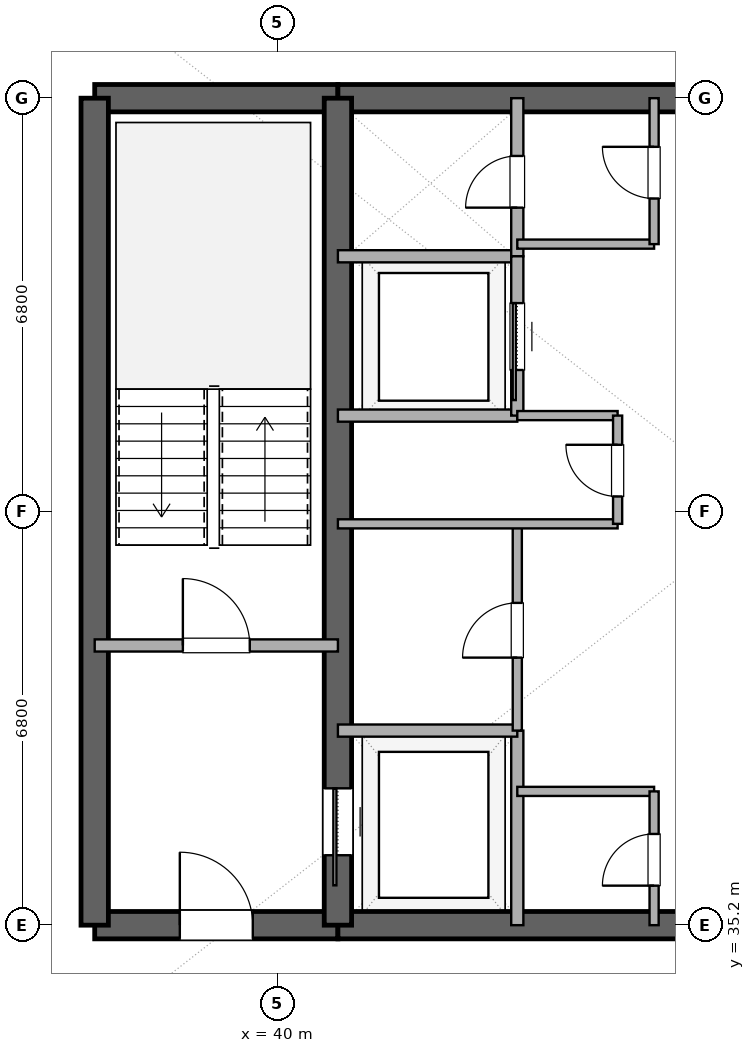
"""IFC4 building model, lengths in metres.
Left out: names, types, materials, properties, quantities, classifications, styles, units other than length and angle.
Written with IfcOpenShell. Run it as: python <this file> out.ifc"""

import sys

from ifc_helpers import new_model, si_unit, direction, frame, frame_2d, origin, place, context, subcontext, project, spatial, rectangle, extrude, element, fill, save


model = new_model("IFC4")
c1 = context("Model", 3, precision=1e-05, world=origin(), true_north=direction((0.0, 1.0)))
c2 = subcontext(c1, "Body", "Model", "MODEL_VIEW")
j1 = project(units=[si_unit("LENGTHUNIT", "METRE"), si_unit("PLANEANGLEUNIT", "RADIAN")], contexts=[c1])
p1 = place(None, origin())
s1 = spatial("IfcSite", under=j1, at=p1, CompositionType="ELEMENT")
p2 = place(p1, origin())
s2 = spatial("IfcBuilding", under=s1, at=p2, CompositionType="ELEMENT")
p3 = place(p2, frame((0.0, 0.0, 197.4)))
s3 = spatial("IfcBuildingStorey", under=s2, at=p3, CompositionType="ELEMENT", Elevation=197.4)
p4 = place(p3, frame((37.0, 35.2, 0.0), z_axis=(0.0, 0.0, 1.0), x_axis=(1.0, 0.0, 0.0)))
e1 = element("IfcWall", 1, at=p4, inside=s3, PredefinedType="SHEAR", context=c2, shape_type="SweptSolid", body=[
    extrude(rectangle(XDim=4.0, YDim=0.45, at=frame_2d((2.0, 0.0))), origin(), (0.0, 0.0, 1.0), 3.25),
])
p5 = place(p4, frame((1.4, 0.0, 0.0)))
e2 = element("IfcOpeningElement", 2, at=p5, cuts=e1, PredefinedType="OPENING", context=c2, shape_type="SweptSolid", body=[
    extrude(rectangle(XDim=1.2, YDim=2.15, at=frame_2d((0.6, 1.075))), frame((0.0, 0.235, 0.0), z_axis=(0.0, -1.0, 0.0), x_axis=(1.0, 0.0, 0.0)), (0.0, 0.0, 1.0), 0.47),
])
p6 = place(p3, frame((41.0, 35.2, 0.0), z_axis=(0.0, 0.0, 1.0), x_axis=(1.0, 0.0, 0.0)))
e3 = element("IfcWall", 3, at=p6, inside=s3, PredefinedType="SHEAR", context=c2, shape_type="SweptSolid", body=[
    extrude(rectangle(XDim=14.0, YDim=0.45, at=frame_2d((7.0, 0.0))), origin(), (0.0, 0.0, 1.0), 3.25),
])
p7 = place(p6, frame((6.1, 0.0, 0.0)))
e4 = element("IfcOpeningElement", 4, at=p7, cuts=e3, PredefinedType="OPENING", context=c2, shape_type="SweptSolid", body=[
    extrude(rectangle(XDim=1.8, YDim=2.25, at=frame_2d((0.9, 1.125))), frame((0.0, 0.235, 0.0), z_axis=(0.0, -1.0, 0.0), x_axis=(1.0, 0.0, 0.0)), (0.0, 0.0, 1.0), 0.47),
])
p8 = place(p3, frame((37.0, 48.8, 0.0), z_axis=(0.0, 0.0, 1.0), x_axis=(1.0, 0.0, 0.0)))
e5 = element("IfcWall", 5, at=p8, inside=s3, PredefinedType="SHEAR", context=c2, shape_type="SweptSolid", body=[
    extrude(rectangle(XDim=4.0, YDim=0.45, at=frame_2d((2.0, 0.0))), origin(), (0.0, 0.0, 1.0), 3.25),
])
p9 = place(p3, frame((41.0, 48.8, 0.0), z_axis=(0.0, 0.0, 1.0), x_axis=(1.0, 0.0, 0.0)))
e6 = element("IfcWall", 6, at=p9, inside=s3, PredefinedType="SHEAR", context=c2, shape_type="SweptSolid", body=[
    extrude(rectangle(XDim=14.0, YDim=0.45, at=frame_2d((7.0, 0.0))), origin(), (0.0, 0.0, 1.0), 3.25),
])
p10 = place(p9, frame((6.1, 0.0, 0.0)))
e7 = element("IfcOpeningElement", 7, at=p10, cuts=e6, PredefinedType="OPENING", context=c2, shape_type="SweptSolid", body=[
    extrude(rectangle(XDim=1.8, YDim=2.25, at=frame_2d((0.9, 1.125))), frame((0.0, 0.235, 0.0), z_axis=(0.0, -1.0, 0.0), x_axis=(1.0, 0.0, 0.0)), (0.0, 0.0, 1.0), 0.47),
])
p11 = place(p3, frame((37.0, 35.2, 0.0), z_axis=(0.0, 0.0, 1.0), x_axis=(0.0, 1.0, 0.0)))
e8 = element("IfcWall", 8, at=p11, inside=s3, PredefinedType="SHEAR", context=c2, shape_type="SweptSolid", body=[
    extrude(rectangle(XDim=13.6, YDim=0.45, at=frame_2d((6.8, 0.0))), origin(), (0.0, 0.0, 1.0), 3.25),
])
p12 = place(p3, frame((41.0, 35.2, 0.0), z_axis=(0.0, 0.0, 1.0), x_axis=(0.0, 1.0, 0.0)))
e9 = element("IfcWall", 9, at=p12, inside=s3, PredefinedType="SHEAR", context=c2, shape_type="SweptSolid", body=[
    extrude(rectangle(XDim=13.6, YDim=0.45, at=frame_2d((6.8, 0.0))), origin(), (0.0, 0.0, 1.0), 3.25),
])
p13 = place(p12, frame((1.15, 0.0, 0.0)))
e10 = element("IfcOpeningElement", 10, at=p13, cuts=e9, PredefinedType="OPENING", context=c2, shape_type="SweptSolid", body=[
    extrude(rectangle(XDim=1.1, YDim=2.2, at=frame_2d((0.55, 1.1))), frame((0.0, 0.235, 0.0), z_axis=(0.0, -1.0, 0.0), x_axis=(1.0, 0.0, 0.0)), (0.0, 0.0, 1.0), 0.47),
])
p14 = place(p3, frame((37.0, 39.8, 0.0), z_axis=(0.0, 0.0, 1.0), x_axis=(1.0, 0.0, 0.0)))
e11 = element("IfcWall", 11, at=p14, inside=s3, PredefinedType="SOLIDWALL", context=c2, shape_type="SweptSolid", body=[
    extrude(rectangle(XDim=4.0, YDim=0.2, at=frame_2d((2.0, 0.0))), origin(), (0.0, 0.0, 1.0), 2.61),
])
p15 = place(p14, frame((1.45, 0.0, 0.0)))
e12 = element("IfcOpeningElement", 12, at=p15, cuts=e11, PredefinedType="OPENING", context=c2, shape_type="SweptSolid", body=[
    extrude(rectangle(XDim=1.1, YDim=2.15, at=frame_2d((0.55, 1.075))), frame((0.0, 0.11, 0.0), z_axis=(0.0, -1.0, 0.0), x_axis=(1.0, 0.0, 0.0)), (0.0, 0.0, 1.0), 0.22),
])
p16 = place(p3, frame((43.95, 35.2, 0.0), z_axis=(0.0, 0.0, 1.0), x_axis=(0.0, 1.0, 0.0)))
e13 = element("IfcWall", 13, at=p16, inside=s3, PredefinedType="SOLIDWALL", context=c2, shape_type="SweptSolid", body=[
    extrude(rectangle(XDim=3.2, YDim=0.2, at=frame_2d((1.6, 0.0))), origin(), (0.0, 0.0, 1.0), 2.61),
])
for number, where, z_axis, x_axis in (
    (14, (41.0, 38.4, 0.0), (0.0, 0.0, 1.0), (1.0, 0.0, 0.0)),
    (15, (41.0, 46.2, 0.0), (0.0, 0.0, 1.0), (1.0, 0.0, 0.0)),
):
    element("IfcWall", number, at=place(p3, frame(where, z_axis=z_axis, x_axis=x_axis)), inside=s3, PredefinedType="SOLIDWALL", context=c2, shape_type="SweptSolid", body=[
        extrude(rectangle(XDim=2.95, YDim=0.2, at=frame_2d((1.475, 0.0))), origin(), (0.0, 0.0, 1.0), 2.61),
    ])
p17 = place(p3, frame((43.95, 46.2, 0.0), z_axis=(0.0, 0.0, 1.0), x_axis=(0.0, 1.0, 0.0)))
e16 = element("IfcWall", 16, at=p17, inside=s3, PredefinedType="SOLIDWALL", context=c2, shape_type="SweptSolid", body=[
    extrude(rectangle(XDim=2.6, YDim=0.2, at=frame_2d((1.3, 0.0))), origin(), (0.0, 0.0, 1.0), 2.61),
])
p18 = place(p17, frame((0.8, 0.0, 0.0)))
e17 = element("IfcOpeningElement", 17, at=p18, cuts=e16, PredefinedType="OPENING", context=c2, shape_type="SweptSolid", body=[
    extrude(rectangle(XDim=0.85, YDim=2.15, at=frame_2d((0.425, 1.075))), frame((0.0, 0.11, 0.0), z_axis=(0.0, -1.0, 0.0), x_axis=(1.0, 0.0, 0.0)), (0.0, 0.0, 1.0), 0.22),
])
p19 = place(p3, frame((41.0, 43.58, 0.0), z_axis=(0.0, 0.0, 1.0), x_axis=(1.0, 0.0, 0.0)))
e18 = element("IfcWall", 18, at=p19, inside=s3, PredefinedType="SOLIDWALL", context=c2, shape_type="SweptSolid", body=[
    extrude(rectangle(XDim=2.95, YDim=0.2, at=frame_2d((1.475, 0.0))), origin(), (0.0, 0.0, 1.0), 2.61),
])
p20 = place(p3, frame((43.95, 43.58, 0.0), z_axis=(0.0, 0.0, 1.0), x_axis=(0.0, 1.0, 0.0)))
e19 = element("IfcWall", 19, at=p20, inside=s3, PredefinedType="SOLIDWALL", context=c2, shape_type="SweptSolid", body=[
    extrude(rectangle(XDim=2.62, YDim=0.2, at=frame_2d((1.31, 0.0))), origin(), (0.0, 0.0, 1.0), 2.61),
])
p21 = place(p20, frame((0.75, 0.0, 0.0)))
e20 = element("IfcOpeningElement", 20, at=p21, cuts=e19, PredefinedType="OPENING", context=c2, shape_type="SweptSolid", body=[
    extrude(rectangle(XDim=1.1, YDim=2.2, at=frame_2d((0.55, 1.1))), frame((0.0, 0.11, 0.0), z_axis=(0.0, -1.0, 0.0), x_axis=(1.0, 0.0, 0.0)), (0.0, 0.0, 1.0), 0.22),
])
p22 = place(p3, frame((43.95, 38.4, 0.0), z_axis=(0.0, 0.0, 1.0), x_axis=(0.0, 1.0, 0.0)))
e21 = element("IfcWall", 21, at=p22, inside=s3, PredefinedType="PARTITIONING", context=c2, shape_type="SweptSolid", body=[
    extrude(rectangle(XDim=3.4, YDim=0.15, at=frame_2d((1.7, 0.0))), origin(), (0.0, 0.0, 1.0), 2.61),
])
p23 = place(p22, frame((1.2, 0.0, 0.0)))
e22 = element("IfcOpeningElement", 22, at=p23, cuts=e21, PredefinedType="OPENING", context=c2, shape_type="SweptSolid", body=[
    extrude(rectangle(XDim=0.9, YDim=2.15, at=frame_2d((0.45, 1.075))), frame((0.0, 0.085, 0.0), z_axis=(0.0, -1.0, 0.0), x_axis=(1.0, 0.0, 0.0)), (0.0, 0.0, 1.0), 0.17),
])
p24 = place(p3, frame((41.0, 41.8, 0.0), z_axis=(0.0, 0.0, 1.0), x_axis=(1.0, 0.0, 0.0)))
e23 = element("IfcWall", 23, at=p24, inside=s3, PredefinedType="PARTITIONING", context=c2, shape_type="SweptSolid", body=[
    extrude(rectangle(XDim=4.6, YDim=0.15, at=frame_2d((2.3, 0.0))), origin(), (0.0, 0.0, 1.0), 2.61),
])
p25 = place(p3, frame((43.95, 43.58, 0.0), z_axis=(0.0, 0.0, 1.0), x_axis=(1.0, 0.0, 0.0)))
e24 = element("IfcWall", 24, at=p25, inside=s3, PredefinedType="PARTITIONING", context=c2, shape_type="SweptSolid", body=[
    extrude(rectangle(XDim=1.65, YDim=0.15, at=frame_2d((0.825, 0.0))), origin(), (0.0, 0.0, 1.0), 2.61),
])
p26 = place(p3, frame((45.6, 41.8, 0.0), z_axis=(0.0, 0.0, 1.0), x_axis=(0.0, 1.0, 0.0)))
e25 = element("IfcWall", 25, at=p26, inside=s3, PredefinedType="PARTITIONING", context=c2, shape_type="SweptSolid", body=[
    extrude(rectangle(XDim=1.78, YDim=0.15, at=frame_2d((0.89, 0.0))), origin(), (0.0, 0.0, 1.0), 2.61),
])
p27 = place(p26, frame((0.45, 0.0, 0.0)))
e26 = element("IfcOpeningElement", 26, at=p27, cuts=e25, PredefinedType="OPENING", context=c2, shape_type="SweptSolid", body=[
    extrude(rectangle(XDim=0.85, YDim=2.15, at=frame_2d((0.425, 1.075))), frame((0.0, 0.085, 0.0), z_axis=(0.0, -1.0, 0.0), x_axis=(1.0, 0.0, 0.0)), (0.0, 0.0, 1.0), 0.17),
])
p28 = place(p3, frame((43.95, 37.4, 0.0), z_axis=(0.0, 0.0, 1.0), x_axis=(1.0, 0.0, 0.0)))
e27 = element("IfcWall", 27, at=p28, inside=s3, PredefinedType="PARTITIONING", context=c2, shape_type="SweptSolid", body=[
    extrude(rectangle(XDim=2.25, YDim=0.15, at=frame_2d((1.125, 0.0))), origin(), (0.0, 0.0, 1.0), 2.61),
])
p29 = place(p3, frame((46.2, 35.2, 0.0), z_axis=(0.0, 0.0, 1.0), x_axis=(0.0, 1.0, 0.0)))
e28 = element("IfcWall", 28, at=p29, inside=s3, PredefinedType="PARTITIONING", context=c2, shape_type="SweptSolid", body=[
    extrude(rectangle(XDim=2.2, YDim=0.15, at=frame_2d((1.1, 0.0))), origin(), (0.0, 0.0, 1.0), 2.61),
])
p30 = place(p29, frame((0.65, 0.0, 0.0)))
e29 = element("IfcOpeningElement", 29, at=p30, cuts=e28, PredefinedType="OPENING", context=c2, shape_type="SweptSolid", body=[
    extrude(rectangle(XDim=0.85, YDim=2.15, at=frame_2d((0.425, 1.075))), frame((0.0, 0.085, 0.0), z_axis=(0.0, -1.0, 0.0), x_axis=(1.0, 0.0, 0.0)), (0.0, 0.0, 1.0), 0.17),
])
p31 = place(p3, frame((43.95, 46.4, 0.0), z_axis=(0.0, 0.0, 1.0), x_axis=(1.0, 0.0, 0.0)))
e30 = element("IfcWall", 30, at=p31, inside=s3, PredefinedType="PARTITIONING", context=c2, shape_type="SweptSolid", body=[
    extrude(rectangle(XDim=2.25, YDim=0.15, at=frame_2d((1.125, 0.0))), origin(), (0.0, 0.0, 1.0), 2.61),
])
p32 = place(p3, frame((46.2, 46.4, 0.0), z_axis=(0.0, 0.0, 1.0), x_axis=(0.0, 1.0, 0.0)))
e31 = element("IfcWall", 31, at=p32, inside=s3, PredefinedType="PARTITIONING", context=c2, shape_type="SweptSolid", body=[
    extrude(rectangle(XDim=2.4, YDim=0.15, at=frame_2d((1.2, 0.0))), origin(), (0.0, 0.0, 1.0), 2.61),
])
p33 = place(p32, frame((0.75, 0.0, 0.0)))
e32 = element("IfcOpeningElement", 32, at=p33, cuts=e31, PredefinedType="OPENING", context=c2, shape_type="SweptSolid", body=[
    extrude(rectangle(XDim=0.85, YDim=2.15, at=frame_2d((0.425, 1.075))), frame((0.0, 0.085, 0.0), z_axis=(0.0, -1.0, 0.0), x_axis=(1.0, 0.0, 0.0)), (0.0, 0.0, 1.0), 0.17),
])
p34 = place(p13, origin())
e33 = element("IfcDoor", 33, at=p34, inside=s3, OperationType="SLIDING_TO_LEFT", PredefinedType="DOOR", context=c2, shape_type="SweptSolid", body=[
    extrude(rectangle(XDim=1.1, YDim=2.2, at=frame_2d((0.55, 1.1))), frame((0.0, 0.025, 0.0), z_axis=(0.0, -1.0, 0.0), x_axis=(1.0, 0.0, 0.0)), (0.0, 0.0, 1.0), 0.05),
])
fill(e10, e33)
p35 = place(p5, origin())
e34 = element("IfcDoor", 34, at=p35, inside=s3, OperationType="SINGLE_SWING_LEFT", PredefinedType="DOOR", context=c2, shape_type="SweptSolid", body=[
    extrude(rectangle(XDim=1.2, YDim=2.15, at=frame_2d((0.6, 1.075))), frame((0.0, 0.025, 0.0), z_axis=(0.0, -1.0, 0.0), x_axis=(1.0, 0.0, 0.0)), (0.0, 0.0, 1.0), 0.05),
])
fill(e2, e34)
p36 = place(p15, origin())
e35 = element("IfcDoor", 35, at=p36, inside=s3, OperationType="SINGLE_SWING_LEFT", PredefinedType="DOOR", context=c2, shape_type="SweptSolid", body=[
    extrude(rectangle(XDim=1.1, YDim=2.15, at=frame_2d((0.55, 1.075))), frame((0.0, 0.025, 0.0), z_axis=(0.0, -1.0, 0.0), x_axis=(1.0, 0.0, 0.0)), (0.0, 0.0, 1.0), 0.05),
])
fill(e12, e35)
p37 = place(p18, origin())
e36 = element("IfcDoor", 36, at=p37, inside=s3, OperationType="SINGLE_SWING_LEFT", PredefinedType="DOOR", context=c2, shape_type="SweptSolid", body=[
    extrude(rectangle(XDim=0.85, YDim=2.15, at=frame_2d((0.425, 1.075))), frame((0.0, 0.025, 0.0), z_axis=(0.0, -1.0, 0.0), x_axis=(1.0, 0.0, 0.0)), (0.0, 0.0, 1.0), 0.05),
])
fill(e17, e36)
p38 = place(p21, origin())
e37 = element("IfcDoor", 37, at=p38, inside=s3, OperationType="SLIDING_TO_LEFT", PredefinedType="DOOR", context=c2, shape_type="SweptSolid", body=[
    extrude(rectangle(XDim=1.1, YDim=2.2, at=frame_2d((0.55, 1.1))), frame((0.0, 0.025, 0.0), z_axis=(0.0, -1.0, 0.0), x_axis=(1.0, 0.0, 0.0)), (0.0, 0.0, 1.0), 0.05),
])
fill(e20, e37)
p39 = place(p23, origin())
e38 = element("IfcDoor", 38, at=p39, inside=s3, OperationType="SINGLE_SWING_LEFT", PredefinedType="DOOR", context=c2, shape_type="SweptSolid", body=[
    extrude(rectangle(XDim=0.9, YDim=2.15, at=frame_2d((0.45, 1.075))), frame((0.0, 0.025, 0.0), z_axis=(0.0, -1.0, 0.0), x_axis=(1.0, 0.0, 0.0)), (0.0, 0.0, 1.0), 0.05),
])
fill(e22, e38)
p40 = place(p27, origin())
e39 = element("IfcDoor", 39, at=p40, inside=s3, OperationType="SINGLE_SWING_RIGHT", PredefinedType="DOOR", context=c2, shape_type="SweptSolid", body=[
    extrude(rectangle(XDim=0.85, YDim=2.15, at=frame_2d((0.425, 1.075))), frame((0.0, 0.025, 0.0), z_axis=(0.0, -1.0, 0.0), x_axis=(1.0, 0.0, 0.0)), (0.0, 0.0, 1.0), 0.05),
])
fill(e26, e39)
p41 = place(p30, origin())
e40 = element("IfcDoor", 40, at=p41, inside=s3, OperationType="SINGLE_SWING_LEFT", PredefinedType="DOOR", context=c2, shape_type="SweptSolid", body=[
    extrude(rectangle(XDim=0.85, YDim=2.15, at=frame_2d((0.425, 1.075))), frame((0.0, 0.025, 0.0), z_axis=(0.0, -1.0, 0.0), x_axis=(1.0, 0.0, 0.0)), (0.0, 0.0, 1.0), 0.05),
])
fill(e29, e40)
p42 = place(p33, origin())
e41 = element("IfcDoor", 41, at=p42, inside=s3, OperationType="SINGLE_SWING_RIGHT", PredefinedType="DOOR", context=c2, shape_type="SweptSolid", body=[
    extrude(rectangle(XDim=0.85, YDim=2.15, at=frame_2d((0.425, 1.075))), frame((0.0, 0.025, 0.0), z_axis=(0.0, -1.0, 0.0), x_axis=(1.0, 0.0, 0.0)), (0.0, 0.0, 1.0), 0.05),
])
fill(e32, e41)
save(model, sys.argv[1])
